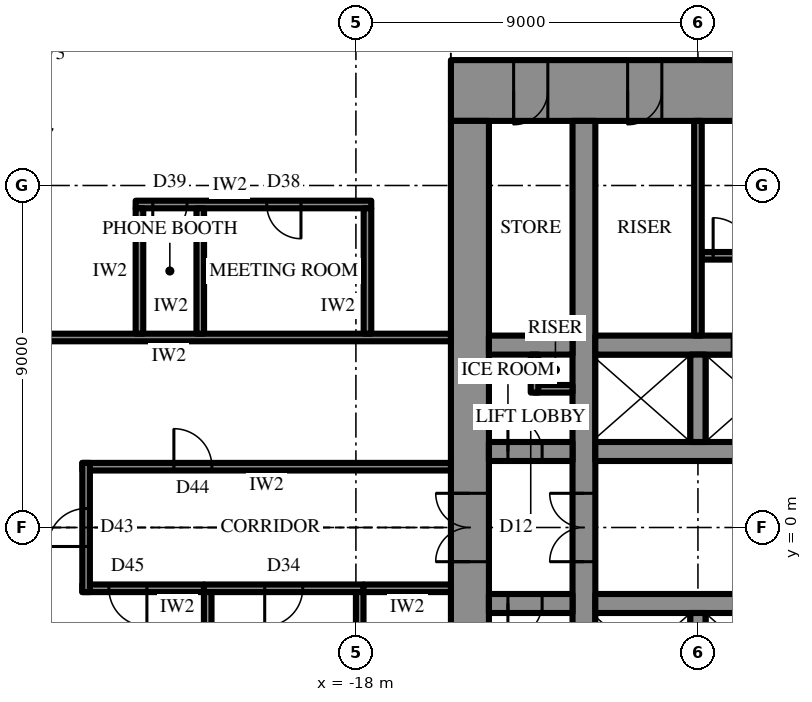
"""IFC4 building model, lengths in metres.
Left out: names, types, materials, properties, quantities, classifications, styles, units other than length and angle.
Written with IfcOpenShell. Run it as: python <this file> out.ifc"""

import sys

from ifc_helpers import new_model, si_unit, direction, frame, frame_2d, origin, place, context, subcontext, project, spatial, rectangle, extrude, element, fill, save


model = new_model("IFC4")
c1 = context("Model", 3, precision=1e-05, world=origin(), true_north=direction((0.0, 1.0)))
c2 = subcontext(c1, "Body", "Model", "MODEL_VIEW")
j1 = project(units=[si_unit("LENGTHUNIT", "METRE"), si_unit("PLANEANGLEUNIT", "RADIAN")], contexts=[c1])
p1 = place(None, origin())
s1 = spatial("IfcSite", under=j1, at=p1, CompositionType="ELEMENT")
p2 = place(p1, origin())
s2 = spatial("IfcBuilding", under=s1, at=p2, CompositionType="ELEMENT")
p3 = place(p2, frame((0.0, 0.0, 240.7)))
s3 = spatial("IfcBuildingStorey", under=s2, at=p3, CompositionType="ELEMENT", Elevation=240.7)
p4 = place(p3, frame((-15.5, 11.5, 0.0), z_axis=(0.0, 0.0, 1.0), x_axis=(1.0, 0.0, 0.0)))
e1 = element("IfcWall", 1, at=p4, inside=s3, PredefinedType="SHEAR", context=c2, shape_type="SweptSolid", body=[
    extrude(rectangle(XDim=31.0, YDim=1.6, at=frame_2d((15.5, 0.0))), origin(), (0.0, 0.0, 1.0), 4.2),
])
p5 = place(p4, frame((16.35, 0.0, 0.0)))
e2 = element("IfcOpeningElement", 2, at=p5, cuts=e1, PredefinedType="OPENING", context=c2, shape_type="SweptSolid", body=[
    extrude(rectangle(XDim=0.9, YDim=2.2, at=frame_2d((0.45, 1.1))), frame((0.0, 0.81, 0.0), z_axis=(0.0, -1.0, 0.0), x_axis=(1.0, 0.0, 0.0)), (0.0, 0.0, 1.0), 1.62),
])
p6 = place(p4, frame((19.35, 0.0, 0.0)))
e3 = element("IfcOpeningElement", 3, at=p6, cuts=e1, PredefinedType="OPENING", context=c2, shape_type="SweptSolid", body=[
    extrude(rectangle(XDim=0.9, YDim=2.2, at=frame_2d((0.45, 1.1))), frame((0.0, 0.81, 0.0), z_axis=(0.0, -1.0, 0.0), x_axis=(1.0, 0.0, 0.0)), (0.0, 0.0, 1.0), 1.62),
])
p7 = place(p4, frame((22.4, 0.0, 0.0)))
e4 = element("IfcOpeningElement", 4, at=p7, cuts=e1, PredefinedType="OPENING", context=c2, shape_type="SweptSolid", body=[
    extrude(rectangle(XDim=1.0, YDim=2.2, at=frame_2d((0.5, 1.1))), frame((0.0, 0.81, 0.0), z_axis=(0.0, -1.0, 0.0), x_axis=(1.0, 0.0, 0.0)), (0.0, 0.0, 1.0), 1.62),
])
p8 = place(p4, frame((1.65, 0.0, 0.0)))
e5 = element("IfcOpeningElement", 5, at=p8, cuts=e1, PredefinedType="OPENING", context=c2, shape_type="SweptSolid", body=[
    extrude(rectangle(XDim=0.9, YDim=2.2, at=frame_2d((0.45, 1.1))), frame((0.0, 0.81, 0.0), z_axis=(0.0, -1.0, 0.0), x_axis=(1.0, 0.0, 0.0)), (0.0, 0.0, 1.0), 1.62),
])
p9 = place(p4, frame((4.65, 0.0, 0.0)))
e6 = element("IfcOpeningElement", 6, at=p9, cuts=e1, PredefinedType="OPENING", context=c2, shape_type="SweptSolid", body=[
    extrude(rectangle(XDim=0.9, YDim=2.2, at=frame_2d((0.45, 1.1))), frame((0.0, 0.81, 0.0), z_axis=(0.0, -1.0, 0.0), x_axis=(1.0, 0.0, 0.0)), (0.0, 0.0, 1.0), 1.62),
])
p10 = place(p4, frame((25.45, 0.0, 0.0)))
e7 = element("IfcOpeningElement", 7, at=p10, cuts=e1, PredefinedType="OPENING", context=c2, shape_type="SweptSolid", body=[
    extrude(rectangle(XDim=0.9, YDim=2.2, at=frame_2d((0.45, 1.1))), frame((0.0, 0.81, 0.0), z_axis=(0.0, -1.0, 0.0), x_axis=(1.0, 0.0, 0.0)), (0.0, 0.0, 1.0), 1.62),
])
p11 = place(p4, frame((28.45, 0.0, 0.0)))
e8 = element("IfcOpeningElement", 8, at=p11, cuts=e1, PredefinedType="OPENING", context=c2, shape_type="SweptSolid", body=[
    extrude(rectangle(XDim=0.9, YDim=2.2, at=frame_2d((0.45, 1.1))), frame((0.0, 0.81, 0.0), z_axis=(0.0, -1.0, 0.0), x_axis=(1.0, 0.0, 0.0)), (0.0, 0.0, 1.0), 1.62),
])
p12 = place(p3, frame((-15.0, 10.7, 0.0), z_axis=(0.0, 0.0, 1.0), x_axis=(0.0, -1.0, 0.0)))
e9 = element("IfcWall", 9, at=p12, inside=s3, PredefinedType="SHEAR", context=c2, shape_type="SweptSolid", body=[
    extrude(rectangle(XDim=21.4, YDim=1.0, at=frame_2d((10.7, 0.0))), origin(), (0.0, 0.0, 1.0), 4.2),
])
p13 = place(p12, frame((9.8, 0.0, 0.0)))
e10 = element("IfcOpeningElement", 10, at=p13, cuts=e9, PredefinedType="OPENING", context=c2, shape_type="SweptSolid", body=[
    extrude(rectangle(XDim=1.8, YDim=2.4, at=frame_2d((0.9, 1.2))), frame((0.0, 0.51, 0.0), z_axis=(0.0, -1.0, 0.0), x_axis=(1.0, 0.0, 0.0)), (0.0, 0.0, 1.0), 1.02),
])
p14 = place(p3, frame((-12.0, -10.7, 0.0), z_axis=(0.0, 0.0, 1.0), x_axis=(0.0, 1.0, 0.0)))
e11 = element("IfcWall", 11, at=p14, inside=s3, PredefinedType="SHEAR", context=c2, shape_type="SweptSolid", body=[
    extrude(rectangle(XDim=21.4, YDim=0.6, at=frame_2d((10.7, 0.0))), origin(), (0.0, 0.0, 1.0), 4.2),
])
p15 = place(p14, frame((9.8, 0.0, 0.0)))
e12 = element("IfcOpeningElement", 12, at=p15, cuts=e11, PredefinedType="OPENING", context=c2, shape_type="SweptSolid", body=[
    extrude(rectangle(XDim=1.8, YDim=2.4, at=frame_2d((0.9, 1.2))), frame((0.0, 0.31, 0.0), z_axis=(0.0, -1.0, 0.0), x_axis=(1.0, 0.0, 0.0)), (0.0, 0.0, 1.0), 0.62),
])
p16 = place(p3, frame((-14.5, 2.0, 0.0), z_axis=(0.0, 0.0, 1.0), x_axis=(1.0, 0.0, 0.0)))
e13 = element("IfcWall", 13, at=p16, inside=s3, PredefinedType="SHEAR", context=c2, shape_type="SweptSolid", body=[
    extrude(rectangle(XDim=2.2, YDim=0.5, at=frame_2d((1.1, 0.0))), origin(), (0.0, 0.0, 1.0), 4.2),
])
p17 = place(p16, frame((0.5, 0.0, 0.0)))
e14 = element("IfcOpeningElement", 14, at=p17, cuts=e13, PredefinedType="OPENING", context=c2, shape_type="SweptSolid", body=[
    extrude(rectangle(XDim=0.9, YDim=2.2, at=frame_2d((0.45, 1.1))), frame((0.0, 0.26, 0.0), z_axis=(0.0, -1.0, 0.0), x_axis=(1.0, 0.0, 0.0)), (0.0, 0.0, 1.0), 0.52),
])
p18 = place(p3, frame((-11.7, 2.0, 0.0), z_axis=(0.0, 0.0, 1.0), x_axis=(1.0, 0.0, 0.0)))
e15 = element("IfcWall", 15, at=p18, inside=s3, PredefinedType="SHEAR", context=c2, shape_type="SweptSolid", body=[
    extrude(rectangle(XDim=5.9, YDim=0.5, at=frame_2d((2.95, 0.0))), origin(), (0.0, 0.0, 1.0), 4.2),
])
p19 = place(p3, frame((-14.5, 4.8, 0.0), z_axis=(0.0, 0.0, 1.0), x_axis=(1.0, 0.0, 0.0)))
e16 = element("IfcWall", 16, at=p19, inside=s3, PredefinedType="SHEAR", context=c2, shape_type="SweptSolid", body=[
    extrude(rectangle(XDim=2.2, YDim=0.5, at=frame_2d((1.1, 0.0))), origin(), (0.0, 0.0, 1.0), 4.2),
])
p20 = place(p3, frame((-11.7, 4.8, 0.0), z_axis=(0.0, 0.0, 1.0), x_axis=(1.0, 0.0, 0.0)))
e17 = element("IfcWall", 17, at=p20, inside=s3, PredefinedType="SHEAR", context=c2, shape_type="SweptSolid", body=[
    extrude(rectangle(XDim=23.4, YDim=0.5, at=frame_2d((11.7, 0.0))), origin(), (0.0, 0.0, 1.0), 4.2),
])
p21 = place(p20, frame((6.6, 0.0, 0.0)))
e18 = element("IfcOpeningElement", 18, at=p21, cuts=e17, PredefinedType="OPENING", context=c2, shape_type="SweptSolid", body=[
    extrude(rectangle(XDim=1.2, YDim=2.2, at=frame_2d((0.6, 1.1))), frame((0.0, 0.26, 0.0), z_axis=(0.0, -1.0, 0.0), x_axis=(1.0, 0.0, 0.0)), (0.0, 0.0, 1.0), 0.52),
])
p22 = place(p20, frame((3.6, 0.0, 0.0)))
e19 = element("IfcOpeningElement", 19, at=p22, cuts=e17, PredefinedType="OPENING", context=c2, shape_type="SweptSolid", body=[
    extrude(rectangle(XDim=1.2, YDim=2.2, at=frame_2d((0.6, 1.1))), frame((0.0, 0.26, 0.0), z_axis=(0.0, -1.0, 0.0), x_axis=(1.0, 0.0, 0.0)), (0.0, 0.0, 1.0), 0.52),
])
p23 = place(p3, frame((-9.0, 2.25, 0.0), z_axis=(0.0, 0.0, 1.0), x_axis=(0.0, 1.0, 0.0)))
e20 = element("IfcWall", 20, at=p23, inside=s3, PredefinedType="SHEAR", context=c2, shape_type="SweptSolid", body=[
    extrude(rectangle(XDim=2.3, YDim=0.4, at=frame_2d((1.15, 0.0))), origin(), (0.0, 0.0, 1.0), 4.2),
])
p24 = place(p3, frame((-8.9, 7.15, 0.0), z_axis=(0.0, 0.0, 1.0), x_axis=(1.0, 0.0, 0.0)))
e21 = element("IfcWall", 21, at=p24, inside=s3, PredefinedType="SHEAR", context=c2, shape_type="SweptSolid", body=[
    extrude(rectangle(XDim=8.6, YDim=0.2, at=frame_2d((4.3, 0.0))), origin(), (0.0, 0.0, 1.0), 4.2),
])
p25 = place(p24, frame((0.3, 0.0, 0.0)))
e22 = element("IfcOpeningElement", 22, at=p25, cuts=e21, PredefinedType="OPENING", context=c2, shape_type="SweptSolid", body=[
    extrude(rectangle(XDim=1.0, YDim=2.2, at=frame_2d((0.5, 1.1))), frame((0.0, 0.11, 0.0), z_axis=(0.0, -1.0, 0.0), x_axis=(1.0, 0.0, 0.0)), (0.0, 0.0, 1.0), 0.22),
])
p26 = place(p3, frame((3.2, -2.0, 0.0), z_axis=(0.0, 0.0, 1.0), x_axis=(-1.0, 0.0, 0.0)))
e23 = element("IfcWall", 23, at=p26, inside=s3, PredefinedType="SHEAR", context=c2, shape_type="SweptSolid", body=[
    extrude(rectangle(XDim=14.9, YDim=0.5, at=frame_2d((7.45, 0.0))), origin(), (0.0, 0.0, 1.0), 4.2),
])
p27 = place(p26, frame((1.15, 0.0, 0.0)))
e24 = element("IfcOpeningElement", 24, at=p27, cuts=e23, PredefinedType="OPENING", context=c2, shape_type="SweptSolid", body=[
    extrude(rectangle(XDim=1.1, YDim=2.2, at=frame_2d((0.55, 1.1))), frame((0.0, 0.26, 0.0), z_axis=(0.0, -1.0, 0.0), x_axis=(1.0, 0.0, 0.0)), (0.0, 0.0, 1.0), 0.52),
])
p28 = place(p26, frame((4.15, 0.0, 0.0)))
e25 = element("IfcOpeningElement", 25, at=p28, cuts=e23, PredefinedType="OPENING", context=c2, shape_type="SweptSolid", body=[
    extrude(rectangle(XDim=1.1, YDim=2.2, at=frame_2d((0.55, 1.1))), frame((0.0, 0.26, 0.0), z_axis=(0.0, -1.0, 0.0), x_axis=(1.0, 0.0, 0.0)), (0.0, 0.0, 1.0), 0.52),
])
p29 = place(p26, frame((7.15, 0.0, 0.0)))
e26 = element("IfcOpeningElement", 26, at=p29, cuts=e23, PredefinedType="OPENING", context=c2, shape_type="SweptSolid", body=[
    extrude(rectangle(XDim=1.1, YDim=2.2, at=frame_2d((0.55, 1.1))), frame((0.0, 0.26, 0.0), z_axis=(0.0, -1.0, 0.0), x_axis=(1.0, 0.0, 0.0)), (0.0, 0.0, 1.0), 0.52),
])
p30 = place(p26, frame((10.15, 0.0, 0.0)))
e27 = element("IfcOpeningElement", 27, at=p30, cuts=e23, PredefinedType="OPENING", context=c2, shape_type="SweptSolid", body=[
    extrude(rectangle(XDim=1.1, YDim=2.2, at=frame_2d((0.55, 1.1))), frame((0.0, 0.26, 0.0), z_axis=(0.0, -1.0, 0.0), x_axis=(1.0, 0.0, 0.0)), (0.0, 0.0, 1.0), 0.52),
])
p31 = place(p3, frame((-12.3, -2.0, 0.0), z_axis=(0.0, 0.0, 1.0), x_axis=(-1.0, 0.0, 0.0)))
e28 = element("IfcWall", 28, at=p31, inside=s3, PredefinedType="SHEAR", context=c2, shape_type="SweptSolid", body=[
    extrude(rectangle(XDim=2.2, YDim=0.5, at=frame_2d((1.1, 0.0))), origin(), (0.0, 0.0, 1.0), 4.2),
])
p32 = place(p31, frame((0.8, 0.0, 0.0)))
e29 = element("IfcOpeningElement", 29, at=p32, cuts=e28, PredefinedType="OPENING", context=c2, shape_type="SweptSolid", body=[
    extrude(rectangle(XDim=0.9, YDim=2.2, at=frame_2d((0.45, 1.1))), frame((0.0, 0.26, 0.0), z_axis=(0.0, -1.0, 0.0), x_axis=(1.0, 0.0, 0.0)), (0.0, 0.0, 1.0), 0.52),
])
p33 = place(p3, frame((-9.0, -2.25, 0.0), z_axis=(0.0, 0.0, 1.0), x_axis=(0.0, -1.0, 0.0)))
e30 = element("IfcWall", 30, at=p33, inside=s3, PredefinedType="SHEAR", context=c2, shape_type="SweptSolid", body=[
    extrude(rectangle(XDim=2.3, YDim=0.4, at=frame_2d((1.15, 0.0))), origin(), (0.0, 0.0, 1.0), 4.2),
])
p34 = place(p3, frame((-9.0, 5.05, 0.0), z_axis=(0.0, 0.0, 1.0), x_axis=(0.0, 1.0, 0.0)))
e31 = element("IfcWall", 31, at=p34, inside=s3, PredefinedType="PARTITIONING", context=c2, shape_type="SweptSolid", body=[
    extrude(rectangle(XDim=5.65, YDim=0.2, at=frame_2d((2.825, 0.0))), origin(), (0.0, 0.0, 1.0), 4.0),
])
for number, where, z_axis, x_axis in (
    (32, (-13.3, 3.65, 0.0), (0.0, 0.0, 1.0), (1.0, 0.0, 0.0)),
    (33, (-13.3, 3.55, 0.0), (0.0, 0.0, 1.0), (0.0, 1.0, 0.0)),
):
    element("IfcWall", number, at=place(p3, frame(where, z_axis=z_axis, x_axis=x_axis)), inside=s3, PredefinedType="PARTITIONING", context=c2, shape_type="SweptSolid", body=[
        extrude(rectangle(XDim=1.0, YDim=0.2, at=frame_2d((0.5, 0.0))), origin(), (0.0, 0.0, 1.0), 4.0),
    ])
p35 = place(p3, frame((-17.8, -1.6, 0.0), z_axis=(0.0, 0.0, 1.0), x_axis=(-1.0, 0.0, 0.0)))
e34 = element("IfcWall", 34, at=p35, inside=s3, PredefinedType="PARTITIONING", context=c2, shape_type="SweptSolid", body=[
    extrude(rectangle(XDim=4.2, YDim=0.2, at=frame_2d((2.1, 0.0))), origin(), (0.0, 0.0, 1.0), 4.0),
])
p36 = place(p35, frame((1.6, 0.0, 0.0)))
e35 = element("IfcOpeningElement", 35, at=p36, cuts=e34, PredefinedType="OPENING", context=c2, shape_type="SweptSolid", body=[
    extrude(rectangle(XDim=1.0, YDim=2.2, at=frame_2d((0.5, 1.1))), frame((0.0, 0.11, 0.0), z_axis=(0.0, -1.0, 0.0), x_axis=(1.0, 0.0, 0.0)), (0.0, 0.0, 1.0), 0.22),
])
for number, where, z_axis, x_axis in (
    (36, (-17.9, -1.7, 0.0), (0.0, 0.0, 1.0), (0.0, -1.0, 0.0)),
    (37, (-21.9, -1.7, 0.0), (0.0, 0.0, 1.0), (0.0, -1.0, 0.0)),
):
    element("IfcWall", number, at=place(p3, frame(where, z_axis=z_axis, x_axis=x_axis)), inside=s3, PredefinedType="PARTITIONING", context=c2, shape_type="SweptSolid", body=[
        extrude(rectangle(XDim=3.8, YDim=0.2, at=frame_2d((1.9, 0.0))), origin(), (0.0, 0.0, 1.0), 4.0),
    ])
p37 = place(p3, frame((-15.5, 1.6, 0.0), z_axis=(0.0, 0.0, 1.0), x_axis=(-1.0, 0.0, 0.0)))
e38 = element("IfcWall", 38, at=p37, inside=s3, PredefinedType="PARTITIONING", context=c2, shape_type="SweptSolid", body=[
    extrude(rectangle(XDim=9.7, YDim=0.2, at=frame_2d((4.85, 0.0))), origin(), (0.0, 0.0, 1.0), 4.0),
])
p38 = place(p37, frame((6.29, 0.0, 0.0)))
e39 = element("IfcOpeningElement", 39, at=p38, cuts=e38, PredefinedType="OPENING", context=c2, shape_type="SweptSolid", body=[
    extrude(rectangle(XDim=1.0, YDim=2.2, at=frame_2d((0.5, 1.1))), frame((0.0, 0.11, 0.0), z_axis=(0.0, -1.0, 0.0), x_axis=(1.0, 0.0, 0.0)), (0.0, 0.0, 1.0), 0.22),
])
p39 = place(p3, frame((-22.0, -1.6, 0.0), z_axis=(0.0, 0.0, 1.0), x_axis=(-1.0, 0.0, 0.0)))
e40 = element("IfcWall", 40, at=p39, inside=s3, PredefinedType="PARTITIONING", context=c2, shape_type="SweptSolid", body=[
    extrude(rectangle(XDim=3.2, YDim=0.2, at=frame_2d((1.6, 0.0))), origin(), (0.0, 0.0, 1.0), 4.0),
])
p40 = place(p39, frame((1.5, 0.0, 0.0)))
e41 = element("IfcOpeningElement", 41, at=p40, cuts=e40, PredefinedType="OPENING", context=c2, shape_type="SweptSolid", body=[
    extrude(rectangle(XDim=1.0, YDim=2.2, at=frame_2d((0.5, 1.1))), frame((0.0, 0.11, 0.0), z_axis=(0.0, -1.0, 0.0), x_axis=(1.0, 0.0, 0.0)), (0.0, 0.0, 1.0), 0.22),
])
p41 = place(p3, frame((-15.5, -1.6, 0.0), z_axis=(0.0, 0.0, 1.0), x_axis=(-1.0, 0.0, 0.0)))
e42 = element("IfcWall", 42, at=p41, inside=s3, PredefinedType="PARTITIONING", context=c2, shape_type="SweptSolid", body=[
    extrude(rectangle(XDim=2.3, YDim=0.2, at=frame_2d((1.15, 0.0))), origin(), (0.0, 0.0, 1.0), 4.0),
])
p42 = place(p3, frame((-25.1, -1.7, 0.0), z_axis=(0.0, 0.0, 1.0), x_axis=(0.0, 1.0, 0.0)))
e43 = element("IfcWall", 43, at=p42, inside=s3, PredefinedType="PARTITIONING", context=c2, shape_type="SweptSolid", body=[
    extrude(rectangle(XDim=3.4, YDim=0.2, at=frame_2d((1.7, 0.0))), origin(), (0.0, 0.0, 1.0), 4.0),
])
p43 = place(p42, frame((1.2, 0.0, 0.0)))
e44 = element("IfcOpeningElement", 44, at=p43, cuts=e43, PredefinedType="OPENING", context=c2, shape_type="SweptSolid", body=[
    extrude(rectangle(XDim=1.0, YDim=2.2, at=frame_2d((0.5, 1.1))), frame((0.0, 0.11, 0.0), z_axis=(0.0, -1.0, 0.0), x_axis=(1.0, 0.0, 0.0)), (0.0, 0.0, 1.0), 0.22),
])
p44 = place(p3, frame((-15.5, 5.0, 0.0), z_axis=(0.0, 0.0, 1.0), x_axis=(-1.0, 0.0, 0.0)))
e45 = element("IfcWall", 45, at=p44, inside=s3, PredefinedType="PARTITIONING", context=c2, shape_type="SweptSolid", body=[
    extrude(rectangle(XDim=14.845, YDim=0.2, at=frame_2d((7.423, 0.0))), origin(), (0.0, 0.0, 1.0), 4.0),
])
p45 = place(p3, frame((-17.596, 8.5, 0.0), z_axis=(0.0, 0.0, 1.0), x_axis=(-1.0, 0.0, 0.0)))
e46 = element("IfcWall", 46, at=p45, inside=s3, PredefinedType="PARTITIONING", context=c2, shape_type="SweptSolid", body=[
    extrude(rectangle(XDim=6.2, YDim=0.2, at=frame_2d((3.1, 0.0))), origin(), (0.0, 0.0, 1.0), 4.0),
])
p46 = place(p45, frame((1.85, 0.0, 0.0)))
e47 = element("IfcOpeningElement", 47, at=p46, cuts=e46, PredefinedType="OPENING", context=c2, shape_type="SweptSolid", body=[
    extrude(rectangle(XDim=0.9, YDim=2.2, at=frame_2d((0.45, 1.1))), frame((0.0, 0.11, 0.0), z_axis=(0.0, -1.0, 0.0), x_axis=(1.0, 0.0, 0.0)), (0.0, 0.0, 1.0), 0.22),
])
p47 = place(p45, frame((4.85, 0.0, 0.0)))
e48 = element("IfcOpeningElement", 48, at=p47, cuts=e46, PredefinedType="OPENING", context=c2, shape_type="SweptSolid", body=[
    extrude(rectangle(XDim=0.9, YDim=2.2, at=frame_2d((0.45, 1.1))), frame((0.0, 0.11, 0.0), z_axis=(0.0, -1.0, 0.0), x_axis=(1.0, 0.0, 0.0)), (0.0, 0.0, 1.0), 0.22),
])
for number, where, z_axis, x_axis in (
    (49, (-17.696, 5.1, 0.0), (0.0, 0.0, 1.0), (0.0, 1.0, 0.0)),
    (50, (-22.096, 5.1, 0.0), (0.0, 0.0, 1.0), (0.0, 1.0, 0.0)),
    (51, (-23.696, 5.1, 0.0), (0.0, 0.0, 1.0), (0.0, 1.0, 0.0)),
):
    element("IfcWall", number, at=place(p3, frame(where, z_axis=z_axis, x_axis=x_axis)), inside=s3, PredefinedType="PARTITIONING", context=c2, shape_type="SweptSolid", body=[
        extrude(rectangle(XDim=3.3, YDim=0.2, at=frame_2d((1.65, 0.0))), origin(), (0.0, 0.0, 1.0), 4.0),
    ])
p48 = place(p13, frame((1.8, 0.0, 0.0), z_axis=(0.0, 0.0, 1.0), x_axis=(-1.0, 0.0, 0.0)))
e52 = element("IfcDoor", 52, at=p48, inside=s3, OperationType="DOUBLE_DOOR_SINGLE_SWING", PredefinedType="DOOR", context=c2, shape_type="SweptSolid", body=[
    extrude(rectangle(XDim=1.8, YDim=2.4, at=frame_2d((0.9, 1.2))), frame((0.0, 0.025, 0.0), z_axis=(0.0, -1.0, 0.0), x_axis=(1.0, 0.0, 0.0)), (0.0, 0.0, 1.0), 0.05),
])
fill(e10, e52)
p49 = place(p25, origin())
e53 = element("IfcDoor", 53, at=p49, inside=s3, OperationType="SINGLE_SWING_RIGHT", PredefinedType="DOOR", context=c2, shape_type="SweptSolid", body=[
    extrude(rectangle(XDim=1.0, YDim=2.2, at=frame_2d((0.5, 1.1))), frame((0.0, 0.025, 0.0), z_axis=(0.0, -1.0, 0.0), x_axis=(1.0, 0.0, 0.0)), (0.0, 0.0, 1.0), 0.05),
])
fill(e22, e53)
p50 = place(p8, frame((0.9, 0.0, 0.0), z_axis=(0.0, 0.0, 1.0), x_axis=(-1.0, 0.0, 0.0)))
e54 = element("IfcDoor", 54, at=p50, inside=s3, OperationType="SINGLE_SWING_LEFT", PredefinedType="DOOR", context=c2, shape_type="SweptSolid", body=[
    extrude(rectangle(XDim=0.9, YDim=2.2, at=frame_2d((0.45, 1.1))), frame((0.0, 0.025, 0.0), z_axis=(0.0, -1.0, 0.0), x_axis=(1.0, 0.0, 0.0)), (0.0, 0.0, 1.0), 0.05),
])
fill(e5, e54)
p51 = place(p9, frame((0.9, 0.0, 0.0), z_axis=(0.0, 0.0, 1.0), x_axis=(-1.0, 0.0, 0.0)))
e55 = element("IfcDoor", 55, at=p51, inside=s3, OperationType="SINGLE_SWING_LEFT", PredefinedType="DOOR", context=c2, shape_type="SweptSolid", body=[
    extrude(rectangle(XDim=0.9, YDim=2.2, at=frame_2d((0.45, 1.1))), frame((0.0, 0.025, 0.0), z_axis=(0.0, -1.0, 0.0), x_axis=(1.0, 0.0, 0.0)), (0.0, 0.0, 1.0), 0.05),
])
fill(e6, e55)
p52 = place(p17, origin())
e56 = element("IfcDoor", 56, at=p52, inside=s3, OperationType="SINGLE_SWING_RIGHT", PredefinedType="DOOR", context=c2, shape_type="SweptSolid", body=[
    extrude(rectangle(XDim=0.9, YDim=2.2, at=frame_2d((0.45, 1.1))), frame((0.0, 0.025, 0.0), z_axis=(0.0, -1.0, 0.0), x_axis=(1.0, 0.0, 0.0)), (0.0, 0.0, 1.0), 0.05),
])
fill(e14, e56)
p53 = place(p32, origin())
e57 = element("IfcDoor", 57, at=p53, inside=s3, OperationType="SINGLE_SWING_LEFT", PredefinedType="DOOR", context=c2, shape_type="SweptSolid", body=[
    extrude(rectangle(XDim=0.9, YDim=2.2, at=frame_2d((0.45, 1.1))), frame((0.0, 0.025, 0.0), z_axis=(0.0, -1.0, 0.0), x_axis=(1.0, 0.0, 0.0)), (0.0, 0.0, 1.0), 0.05),
])
fill(e29, e57)
p54 = place(p15, origin())
e58 = element("IfcDoor", 58, at=p54, inside=s3, OperationType="DOUBLE_DOOR_SINGLE_SWING", PredefinedType="DOOR", context=c2, shape_type="SweptSolid", body=[
    extrude(rectangle(XDim=1.8, YDim=2.4, at=frame_2d((0.9, 1.2))), frame((0.0, 0.025, 0.0), z_axis=(0.0, -1.0, 0.0), x_axis=(1.0, 0.0, 0.0)), (0.0, 0.0, 1.0), 0.05),
])
fill(e12, e58)
p55 = place(p36, origin())
e59 = element("IfcDoor", 59, at=p55, inside=s3, OperationType="SINGLE_SWING_LEFT", PredefinedType="DOOR", context=c2, shape_type="SweptSolid", body=[
    extrude(rectangle(XDim=1.0, YDim=2.2, at=frame_2d((0.5, 1.1))), frame((0.0, 0.025, 0.0), z_axis=(0.0, -1.0, 0.0), x_axis=(1.0, 0.0, 0.0)), (0.0, 0.0, 1.0), 0.05),
])
fill(e35, e59)
p56 = place(p38, frame((1.0, 0.0, 0.0), z_axis=(0.0, 0.0, 1.0), x_axis=(-1.0, 0.0, 0.0)))
e60 = element("IfcDoor", 60, at=p56, inside=s3, OperationType="SINGLE_SWING_RIGHT", PredefinedType="DOOR", context=c2, shape_type="SweptSolid", body=[
    extrude(rectangle(XDim=1.0, YDim=2.2, at=frame_2d((0.5, 1.1))), frame((0.0, 0.025, 0.0), z_axis=(0.0, -1.0, 0.0), x_axis=(1.0, 0.0, 0.0)), (0.0, 0.0, 1.0), 0.05),
])
fill(e39, e60)
p57 = place(p40, origin())
e61 = element("IfcDoor", 61, at=p57, inside=s3, OperationType="SINGLE_SWING_RIGHT", PredefinedType="DOOR", context=c2, shape_type="SweptSolid", body=[
    extrude(rectangle(XDim=1.0, YDim=2.2, at=frame_2d((0.5, 1.1))), frame((0.0, 0.025, 0.0), z_axis=(0.0, -1.0, 0.0), x_axis=(1.0, 0.0, 0.0)), (0.0, 0.0, 1.0), 0.05),
])
fill(e41, e61)
p58 = place(p43, origin())
e62 = element("IfcDoor", 62, at=p58, inside=s3, OperationType="SINGLE_SWING_RIGHT", PredefinedType="DOOR", context=c2, shape_type="SweptSolid", body=[
    extrude(rectangle(XDim=1.0, YDim=2.2, at=frame_2d((0.5, 1.1))), frame((0.0, 0.025, 0.0), z_axis=(0.0, -1.0, 0.0), x_axis=(1.0, 0.0, 0.0)), (0.0, 0.0, 1.0), 0.05),
])
fill(e44, e62)
p59 = place(p46, origin())
e63 = element("IfcDoor", 63, at=p59, inside=s3, OperationType="SINGLE_SWING_RIGHT", PredefinedType="DOOR", context=c2, shape_type="SweptSolid", body=[
    extrude(rectangle(XDim=0.9, YDim=2.2, at=frame_2d((0.45, 1.1))), frame((0.0, 0.025, 0.0), z_axis=(0.0, -1.0, 0.0), x_axis=(1.0, 0.0, 0.0)), (0.0, 0.0, 1.0), 0.05),
])
fill(e47, e63)
p60 = place(p47, origin())
e64 = element("IfcDoor", 64, at=p60, inside=s3, OperationType="SINGLE_SWING_LEFT", PredefinedType="DOOR", context=c2, shape_type="SweptSolid", body=[
    extrude(rectangle(XDim=0.9, YDim=2.2, at=frame_2d((0.45, 1.1))), frame((0.0, 0.025, 0.0), z_axis=(0.0, -1.0, 0.0), x_axis=(1.0, 0.0, 0.0)), (0.0, 0.0, 1.0), 0.05),
])
fill(e48, e64)
save(model, sys.argv[1])
